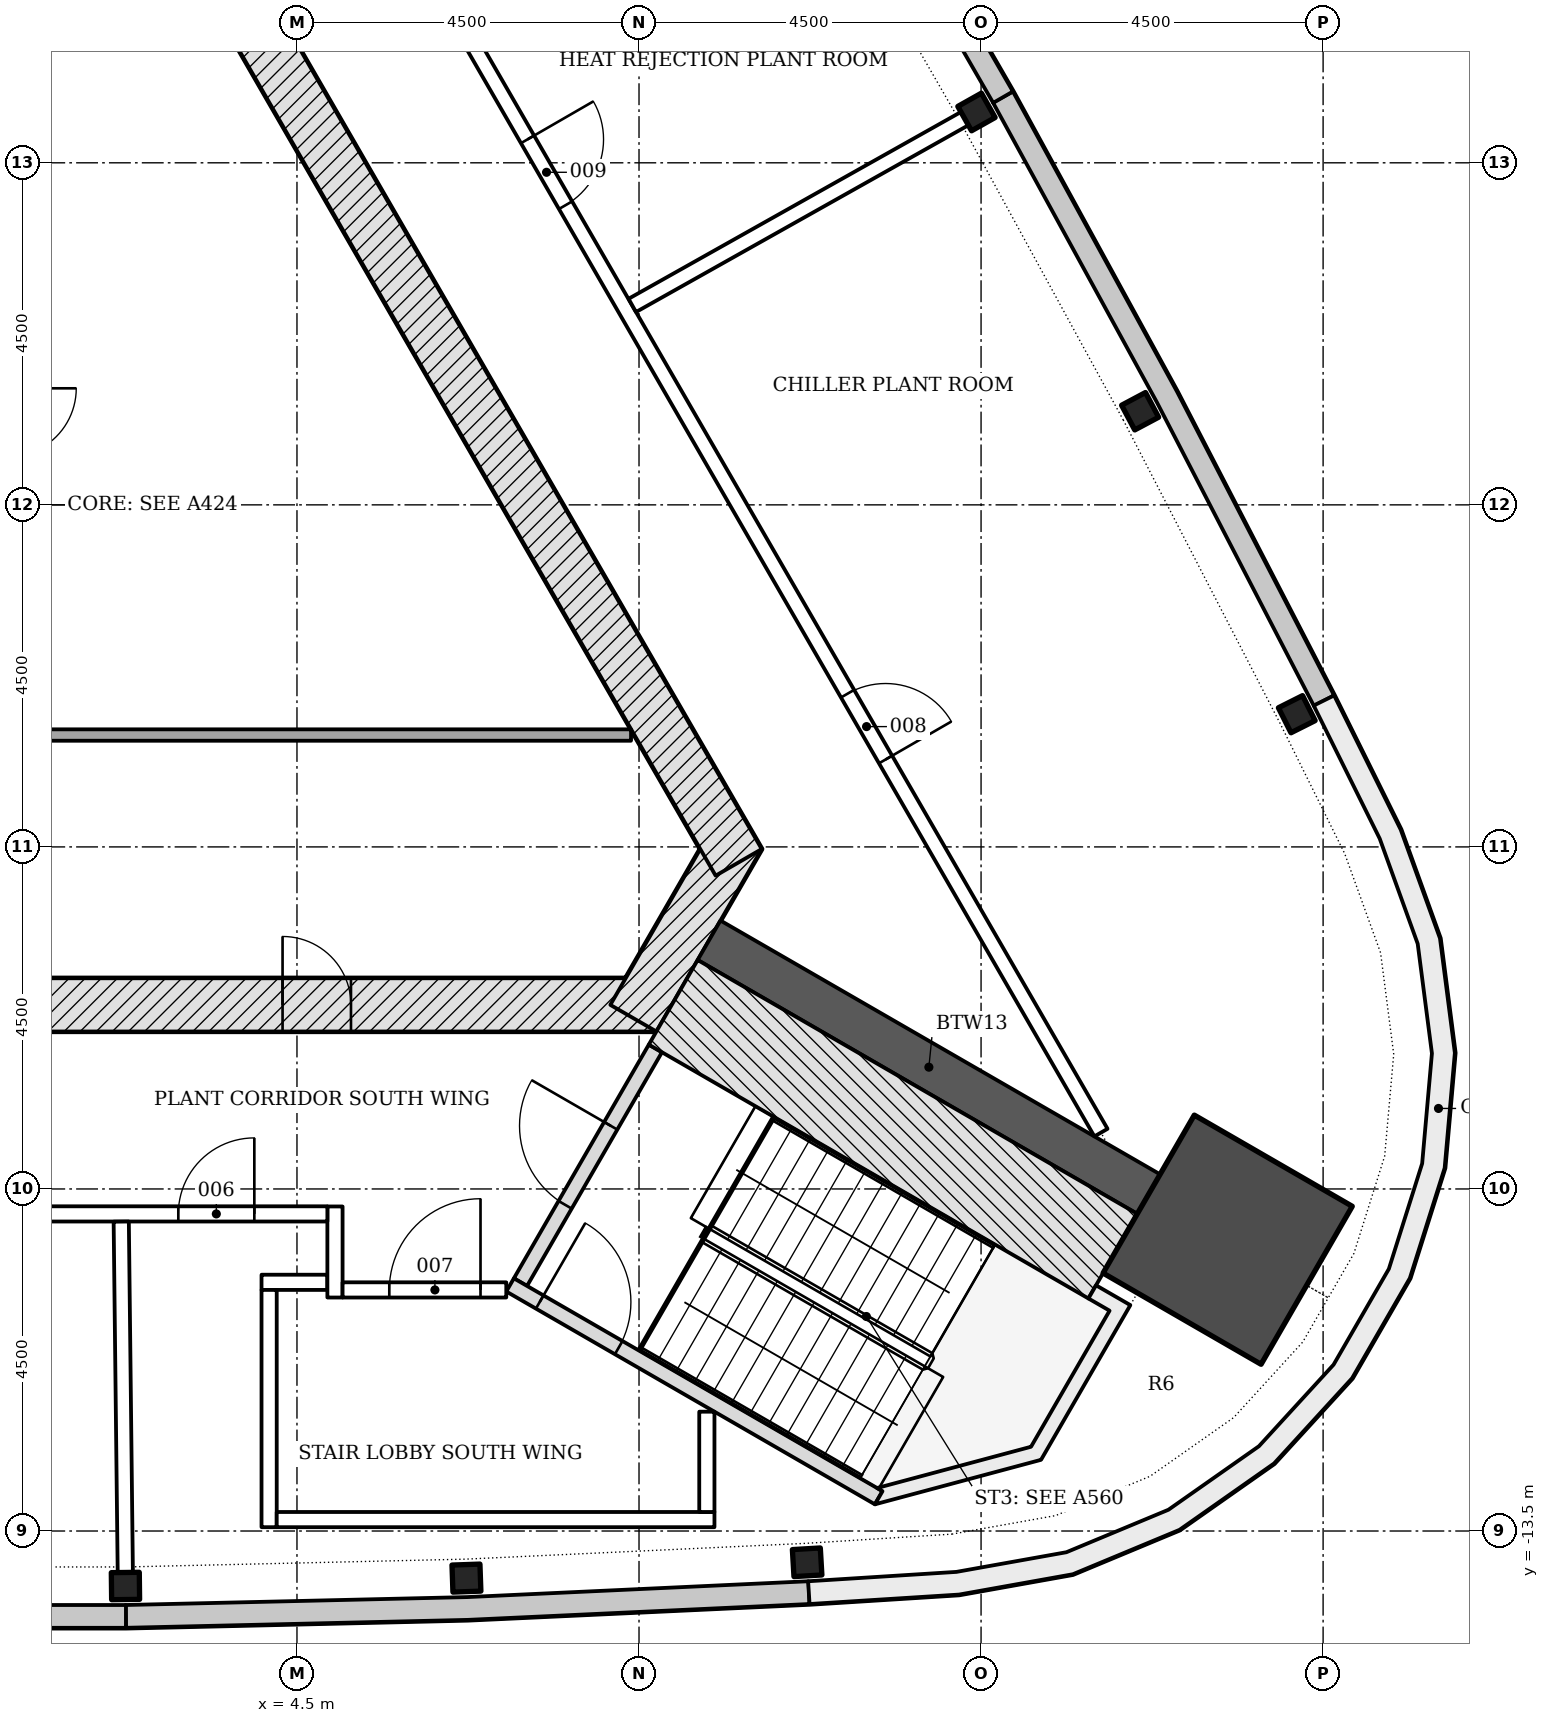
"""IFC4 building model, lengths in metres.
Left out: names, types, materials, properties, quantities, classifications, styles, units other than length and angle.
Written with IfcOpenShell. Run it as: python <this file> out.ifc"""

import sys

from ifc_helpers import new_model, si_unit, direction, frame, frame_2d, origin, origin_2d, place, context, subcontext, project, spatial, polyline, rectangle, i_section, outline, extrude, element, fill, save


model = new_model("IFC4")
c1 = context("Model", 3, precision=1e-05, world=origin(), true_north=direction((0.0, 1.0)))
c2 = subcontext(c1, "Body", "Model", "MODEL_VIEW")
j1 = project(units=[si_unit("LENGTHUNIT", "METRE"), si_unit("PLANEANGLEUNIT", "RADIAN")], contexts=[c1])
p1 = place(None, origin())
s1 = spatial("IfcSite", under=j1, at=p1, CompositionType="ELEMENT")
p2 = place(p1, origin())
s2 = spatial("IfcBuilding", under=s1, at=p2, CompositionType="ELEMENT")
p3 = place(p2, frame((0.0, 0.0, 288.6)))
s3 = spatial("IfcBuildingStorey", under=s2, at=p3, CompositionType="ELEMENT", Elevation=288.6)
p4 = place(p3, frame((-9.229, -6.578, -0.25), z_axis=(0.0, 0.0, 1.0), x_axis=(1.0, 0.0, 0.0)))
e1 = element("IfcWall", 1, at=p4, inside=s3, PredefinedType="SHEAR", context=c2, shape_type="SweptSolid", body=[
    extrude(rectangle(XDim=18.458, YDim=0.7, at=frame_2d((9.229, 0.0))), origin(), (0.0, 0.0, 1.0), 4.5),
])
p5 = place(p4, frame((8.7, 0.0, 0.25)))
e2 = element("IfcOpeningElement", 2, at=p5, cuts=e1, PredefinedType="OPENING", context=c2, shape_type="SweptSolid", body=[
    extrude(rectangle(XDim=1.0, YDim=2.1, at=frame_2d((0.5, 1.05))), frame((0.0, 0.36, 0.0), z_axis=(0.0, -1.0, 0.0), x_axis=(1.0, 0.0, 0.0)), (0.0, 0.0, 1.0), 0.72),
])
p6 = place(p4, frame((3.99, 0.0, 0.25)))
e3 = element("IfcOpeningElement", 3, at=p6, cuts=e1, PredefinedType="OPENING", context=c2, shape_type="SweptSolid", body=[
    extrude(rectangle(XDim=0.9, YDim=2.1, at=frame_2d((0.45, 1.05))), frame((0.0, 0.36, 0.0), z_axis=(0.0, -1.0, 0.0), x_axis=(1.0, 0.0, 0.0)), (0.0, 0.0, 1.0), 0.72),
])
p7 = place(p4, frame((13.539, 0.0, 0.25)))
e4 = element("IfcOpeningElement", 4, at=p7, cuts=e1, PredefinedType="OPENING", context=c2, shape_type="SweptSolid", body=[
    extrude(rectangle(XDim=0.9, YDim=2.1, at=frame_2d((0.45, 1.05))), frame((0.0, 0.36, 0.0), z_axis=(0.0, -1.0, 0.0), x_axis=(1.0, 0.0, 0.0)), (0.0, 0.0, 1.0), 0.72),
])
p8 = place(p3, frame((8.926, -6.753, -0.25), z_axis=(0.0, 0.0, 1.0), x_axis=(0.500042739161, 0.866000726912, 0.0)))
e5 = element("IfcWall", 5, at=p8, inside=s3, PredefinedType="SHEAR", context=c2, shape_type="SweptSolid", body=[
    extrude(rectangle(XDim=2.771, YDim=0.7, at=frame_2d((1.386, 0.0))), origin(), (0.0, 0.0, 1.0), 4.5),
])
p9 = place(p3, frame((10.311, -4.703, -0.25), z_axis=(0.0, 0.0, 1.0), x_axis=(-0.500001446645, 0.866024568562, 0.0)))
e6 = element("IfcWall", 6, at=p9, inside=s3, PredefinedType="SHEAR", context=c2, shape_type="SweptSolid", body=[
    extrude(rectangle(XDim=18.458, YDim=0.7, at=frame_2d((9.229, 0.0))), origin(), (0.0, 0.0, 1.0), 4.5),
])
p10 = place(p3, frame((9.922, -5.728, -0.25), z_axis=(0.0, 0.0, 1.0), x_axis=(0.866032176823, -0.499988268569, 0.0)))
e7 = element("IfcWall", 7, at=p10, inside=s3, PredefinedType="SHEAR", context=c2, shape_type="SweptSolid", body=[
    extrude(rectangle(XDim=6.678, YDim=0.6, at=frame_2d((3.339, 0.0))), origin(), (0.0, 0.0, 1.0), 4.5),
])
p11 = place(p3, frame((16.745, -9.667, -0.25), z_axis=(0.0, 0.0, 1.0), x_axis=(0.866025403784, -0.5, 0.0)))
e8 = element("IfcColumn", 8, at=p11, inside=s3, PredefinedType="COLUMN", context=c2, shape_type="SweptSolid", body=[
    extrude(rectangle(XDim=2.4, YDim=2.4, at=origin_2d()), origin(), (0.0, 0.0, 1.0), 4.5),
])
for number, where, z_axis, x_axis in (
    (9, (2.244, -14.224, -0.25), (0.0, 0.0, 1.0), (1.0, 0.012, 0.0)),
    (10, (6.729, -14.119, -0.25), (0.0, 0.0, 1.0), (0.999, 0.035, 0.0)),
    (11, (11.212, -13.911, -0.25), (0.0, 0.0, 1.0), (0.998, 0.058, 0.0)),
    (12, (17.654, -2.754, -0.25), (0.0, 0.0, 1.0), (-0.449, 0.894, 0.0)),
    (13, (15.593, 1.232, -0.25), (0.0, 0.0, 1.0), (-0.47, 0.883, 0.0)),
    (14, (13.44, 5.169, -0.25), (0.0, 0.0, 1.0), (-0.49, 0.872, 0.0)),
):
    element("IfcColumn", number, at=place(p3, frame(where, z_axis=z_axis, x_axis=x_axis)), inside=s3, PredefinedType="COLUMN", context=c2, shape_type="SweptSolid", body=[
        extrude(i_section(OverallWidth=0.368, OverallDepth=0.356, WebThickness=0.011, FlangeThickness=0.018, FilletRadius=0.015, at=origin_2d()), origin(), (0.0, 0.0, 1.0), 4.5),
    ])
p12 = place(p3, origin())
e15 = element("IfcWall", 15, at=p12, inside=s3, PredefinedType="NOTDEFINED", context=c2, shape_type="SweptSolid", body=[
    extrude(outline(polyline([(2.25, -14.773), (6.749, -14.669), (11.244, -14.46), (11.23, -14.161), (6.738, -14.369), (2.243, -14.474), (2.25, -14.773)])), origin(), (0.0, 0.0, 1.0), 4.25),
])
p13 = place(p3, origin())
e16 = element("IfcWall", 16, at=p13, inside=s3, PredefinedType="NOTDEFINED", context=c2, shape_type="SweptSolid", body=[
    extrude(outline(polyline([(-2.25, -14.773), (2.25, -14.773), (2.25, -14.473), (-2.25, -14.473), (-2.25, -14.773)])), origin(), (0.0, 0.0, 1.0), 1.2),
])
p14 = place(p3, origin())
e17 = element("IfcWall", 17, at=p14, inside=s3, PredefinedType="NOTDEFINED", context=c2, shape_type="SweptSolid", body=[
    extrude(outline(polyline([(18.145, -2.507), (16.078, 1.49), (13.919, 5.438), (13.656, 5.294), (15.813, 1.349), (17.878, -2.645), (18.145, -2.507)])), origin(), (0.0, 0.0, 1.0), 4.25),
])
p15 = place(p3, origin())
e18 = element("IfcWall", 18, at=p15, inside=s3, PredefinedType="NOTDEFINED", context=c2, shape_type="SweptSolid", body=[
    extrude(outline(polyline([(13.919, 5.438), (11.669, 9.335), (11.409, 9.185), (13.659, 5.288), (13.919, 5.438)])), origin(), (0.0, 0.0, 1.0), 1.2),
])
p16 = place(p3, origin())
e19 = element("IfcWall", 19, at=p16, inside=s3, PredefinedType="NOTDEFINED", context=c2, shape_type="SweptSolid", body=[
    extrude(outline(polyline([(11.244, -14.46), (13.211, -14.336), (14.708, -14.069), (16.111, -13.485), (17.355, -12.611), (18.381, -11.49), (19.141, -10.174), (19.599, -8.724), (19.733, -7.21), (19.538, -5.703), (19.021, -4.273), (18.145, -2.507), (17.876, -2.64), (18.745, -4.391), (19.244, -5.774), (19.432, -7.216), (19.303, -8.665), (18.865, -10.052), (18.138, -11.312), (17.156, -12.385), (15.965, -13.22), (14.623, -13.779), (13.176, -14.038), (11.225, -14.161), (11.244, -14.46)])), origin(), (0.0, 0.0, 1.0), 4.25),
])
p17 = place(p3, frame((1.071, -3.028, 0.0), z_axis=(0.0, 0.0, 1.0), x_axis=(1.0, 0.0, 0.0)))
e20 = element("IfcWall", 20, at=p17, inside=s3, PredefinedType="PARTITIONING", context=c2, shape_type="SweptSolid", body=[
    extrude(rectangle(XDim=7.824, YDim=0.15, at=frame_2d((3.912, 0.0))), origin(), (0.0, 0.0, 1.0), 4.25),
])
p18 = place(p3, frame((7.44, -10.226, -0.25), z_axis=(0.0, 0.0, 1.0), x_axis=(0.500022077904, 0.866012656725, 0.0)))
e21 = element("IfcWall", 21, at=p18, inside=s3, PredefinedType="SHEAR", context=c2, shape_type="SweptSolid", body=[
    extrude(rectangle(XDim=3.55, YDim=0.2, at=frame_2d((1.775, 0.0))), origin(), (0.0, 0.0, 1.0), 4.5),
])
p19 = place(p18, frame((1.175, 0.0, 0.25)))
e22 = element("IfcOpeningElement", 22, at=p19, cuts=e21, PredefinedType="OPENING", context=c2, shape_type="SweptSolid", body=[
    extrude(rectangle(XDim=1.2, YDim=2.1, at=frame_2d((0.6, 1.05))), frame((0.0, 0.11, 0.0), z_axis=(0.0, -1.0, 0.0), x_axis=(1.0, 0.0, 0.0)), (0.0, 0.0, 1.0), 0.22),
])
p20 = place(p3, frame((7.304, -10.262, -0.25), z_axis=(0.0, 0.0, 1.0), x_axis=(0.866026594901, -0.49999793692, 0.0)))
e23 = element("IfcWall", 23, at=p20, inside=s3, PredefinedType="SHEAR", context=c2, shape_type="SweptSolid", body=[
    extrude(rectangle(XDim=5.6, YDim=0.2, at=frame_2d((2.8, 0.0))), origin(), (0.0, 0.0, 1.0), 4.5),
])
p21 = place(p20, frame((0.45, 0.0, 0.25)))
e24 = element("IfcOpeningElement", 24, at=p21, cuts=e23, PredefinedType="OPENING", context=c2, shape_type="SweptSolid", body=[
    extrude(rectangle(XDim=1.2, YDim=2.1, at=frame_2d((0.6, 1.05))), frame((0.0, 0.11, 0.0), z_axis=(0.0, -1.0, 0.0), x_axis=(1.0, 0.0, 0.0)), (0.0, 0.0, 1.0), 0.22),
])
p22 = place(p3, frame((9.45, -6.545, -0.25), z_axis=(0.0, 0.0, 1.0), x_axis=(0.866016347338, -0.500015685897, 0.0)))
e25 = element("IfcWall", 25, at=p22, inside=s3, PredefinedType="SHEAR", context=c2, shape_type="SweptSolid", body=[
    extrude(rectangle(XDim=6.678, YDim=1.286, at=frame_2d((3.339, 0.0))), origin(), (0.0, 0.0, 1.0), 4.5),
])
p23 = place(p3, frame((0.0, 0.0, -0.25)))
e26 = element("IfcWall", 26, at=p23, inside=s3, PredefinedType="SHEAR", context=c2, shape_type="SweptSolid", body=[
    extrude(outline(polyline([(12.104, -13.149), (14.289, -12.563), (15.464, -10.528), (15.013, -10.268), (14.913, -10.441), (15.191, -10.601), (14.157, -12.392), (12.132, -12.934), (12.204, -12.976), (12.204, -12.976), (12.204, -12.976), (12.204, -12.976), (12.204, -12.976), (12.204, -12.976), (12.204, -12.976), (12.204, -12.976), (12.204, -12.976), (12.204, -12.976), (12.204, -12.976), (12.204, -12.976), (12.204, -12.976), (12.204, -12.976), (12.204, -12.976), (12.204, -12.976), (12.204, -12.976), (12.104, -13.149)])), origin(), (0.0, 0.0, 1.0), 4.5),
])
p24 = place(p3, frame((4.034, -10.228, 0.0), z_axis=(0.0, 0.0, 1.0), x_axis=(1.0, 0.0, 0.0)))
e27 = element("IfcWall", 27, at=p24, inside=s3, PredefinedType="PARTITIONING", context=c2, shape_type="SweptSolid", body=[
    extrude(rectangle(XDim=0.866, YDim=0.2, at=frame_2d((0.433, 0.0))), origin(), (0.0, 0.0, 1.0), 4.25),
])
p25 = place(p3, frame((5.0, -10.428, 0.0), z_axis=(0.0, 0.0, 1.0), x_axis=(0.0, 1.0, 0.0)))
e28 = element("IfcWall", 28, at=p25, inside=s3, PredefinedType="PARTITIONING", context=c2, shape_type="SweptSolid", body=[
    extrude(rectangle(XDim=1.198, YDim=0.2, at=frame_2d((0.599, 0.0))), origin(), (0.0, 0.0, 1.0), 4.25),
])
p26 = place(p3, frame((5.1, -10.328, 0.0), z_axis=(0.0, 0.0, 1.0), x_axis=(1.0, 0.0, 0.0)))
e29 = element("IfcWall", 29, at=p26, inside=s3, PredefinedType="PARTITIONING", context=c2, shape_type="SweptSolid", body=[
    extrude(rectangle(XDim=2.154, YDim=0.2, at=frame_2d((1.077, 0.0))), origin(), (0.0, 0.0, 1.0), 3.702),
])
p27 = place(p26, frame((0.615, 0.0, 0.0)))
e30 = element("IfcOpeningElement", 30, at=p27, cuts=e29, PredefinedType="OPENING", context=c2, shape_type="SweptSolid", body=[
    extrude(rectangle(XDim=1.2, YDim=2.1, at=frame_2d((0.6, 1.05))), frame((0.0, 0.11, 0.0), z_axis=(0.0, -1.0, 0.0), x_axis=(1.0, 0.0, 0.0)), (0.0, 0.0, 1.0), 0.22),
])
p28 = place(p3, frame((-15.397, -9.328, 0.0), z_axis=(0.0, 0.0, 1.0), x_axis=(1.0, 0.0, 0.0)))
e31 = element("IfcWall", 31, at=p28, inside=s3, PredefinedType="PARTITIONING", context=c2, shape_type="SweptSolid", body=[
    extrude(rectangle(XDim=20.297, YDim=0.2, at=frame_2d((10.148, 0.0))), origin(), (0.0, 0.0, 1.0), 3.702),
])
p29 = place(p28, frame((3.838, 0.0, 0.0)))
e32 = element("IfcOpeningElement", 32, at=p29, cuts=e31, PredefinedType="OPENING", context=c2, shape_type="SweptSolid", body=[
    extrude(rectangle(XDim=1.0, YDim=2.1, at=frame_2d((0.5, 1.05))), frame((0.0, 0.11, 0.0), z_axis=(0.0, -1.0, 0.0), x_axis=(1.0, 0.0, 0.0)), (0.0, 0.0, 1.0), 0.22),
])
p30 = place(p28, frame((12.608, 0.0, 0.0)))
e33 = element("IfcOpeningElement", 33, at=p30, cuts=e31, PredefinedType="OPENING", context=c2, shape_type="SweptSolid", body=[
    extrude(rectangle(XDim=1.0, YDim=2.1, at=frame_2d((0.5, 1.05))), frame((0.0, 0.11, 0.0), z_axis=(0.0, -1.0, 0.0), x_axis=(1.0, 0.0, 0.0)), (0.0, 0.0, 1.0), 0.22),
])
p31 = place(p28, frame((18.336, 0.0, 0.0)))
e34 = element("IfcOpeningElement", 34, at=p31, cuts=e31, PredefinedType="OPENING", context=c2, shape_type="SweptSolid", body=[
    extrude(rectangle(XDim=1.0, YDim=2.1, at=frame_2d((0.5, 1.05))), frame((0.0, 0.11, 0.0), z_axis=(0.0, -1.0, 0.0), x_axis=(1.0, 0.0, 0.0)), (0.0, 0.0, 1.0), 0.22),
])
p32 = place(p3, frame((2.188, -9.429, 0.0), z_axis=(0.0, 0.0, 1.0), x_axis=(0.011564782234, -0.99993312567, 0.0)))
e35 = element("IfcWall", 35, at=p32, inside=s3, PredefinedType="PARTITIONING", context=c2, shape_type="SweptSolid", body=[
    extrude(rectangle(XDim=4.644, YDim=0.2, at=frame_2d((2.322, 0.0))), origin(), (0.0, 0.0, 1.0), 3.702),
])
p33 = place(p3, frame((4.134, -10.328, 0.0), z_axis=(0.0, 0.0, 1.0), x_axis=(0.0, -1.0, 0.0)))
e36 = element("IfcWall", 36, at=p33, inside=s3, PredefinedType="PARTITIONING", context=c2, shape_type="SweptSolid", body=[
    extrude(rectangle(XDim=3.122, YDim=0.2, at=frame_2d((1.561, 0.0))), origin(), (0.0, 0.0, 1.0), 4.25),
])
p34 = place(p3, frame((4.234, -13.35, 0.0), z_axis=(0.0, 0.0, 1.0), x_axis=(1.0, 0.0, 0.0)))
e37 = element("IfcWall", 37, at=p34, inside=s3, PredefinedType="PARTITIONING", context=c2, shape_type="SweptSolid", body=[
    extrude(rectangle(XDim=5.759, YDim=0.2, at=frame_2d((2.879, 0.0))), origin(), (0.0, 0.0, 1.0), 3.702),
])
p35 = place(p3, frame((9.893, -13.25, 0.0), z_axis=(0.0, 0.0, 1.0), x_axis=(0.0, 1.0, 0.0)))
e38 = element("IfcWall", 38, at=p35, inside=s3, PredefinedType="PARTITIONING", context=c2, shape_type="SweptSolid", body=[
    extrude(rectangle(XDim=1.32, YDim=0.2, at=frame_2d((0.66, 0.0))), origin(), (0.0, 0.0, 1.0), 4.25),
])
p36 = place(p3, frame((5.282, 8.708, 0.0), z_axis=(0.0, 0.0, 1.0), x_axis=(0.500001848211, -0.866024336717, 0.0)))
e39 = element("IfcWall", 39, at=p36, inside=s3, PredefinedType="PARTITIONING", context=c2, shape_type="SweptSolid", body=[
    extrude(rectangle(XDim=19.591, YDim=0.2, at=frame_2d((9.795, 0.0))), origin(), (0.0, 0.0, 1.0), 3.702),
])
p37 = place(p36, frame((12.923, 0.0, 0.0)))
e40 = element("IfcOpeningElement", 40, at=p37, cuts=e39, PredefinedType="OPENING", context=c2, shape_type="SweptSolid", body=[
    extrude(rectangle(XDim=1.0, YDim=2.1, at=frame_2d((0.5, 1.05))), frame((0.0, 0.11, 0.0), z_axis=(0.0, -1.0, 0.0), x_axis=(1.0, 0.0, 0.0)), (0.0, 0.0, 1.0), 0.22),
])
p38 = place(p36, frame((4.502, 0.0, 0.0)))
e41 = element("IfcOpeningElement", 41, at=p38, cuts=e39, PredefinedType="OPENING", context=c2, shape_type="SweptSolid", body=[
    extrude(rectangle(XDim=1.0, YDim=2.1, at=frame_2d((0.5, 1.05))), frame((0.0, 0.11, 0.0), z_axis=(0.0, -1.0, 0.0), x_axis=(1.0, 0.0, 0.0)), (0.0, 0.0, 1.0), 0.22),
])
p39 = place(p36, frame((0.965, 0.0, 0.0)))
e42 = element("IfcOpeningElement", 42, at=p39, cuts=e39, PredefinedType="OPENING", context=c2, shape_type="SweptSolid", body=[
    extrude(rectangle(XDim=1.0, YDim=2.1, at=frame_2d((0.5, 1.05))), frame((0.0, 0.11, 0.0), z_axis=(0.0, -1.0, 0.0), x_axis=(1.0, 0.0, 0.0)), (0.0, 0.0, 1.0), 0.22),
])
p40 = place(p3, frame((8.911, 2.624, 0.0), z_axis=(0.0, 0.0, 1.0), x_axis=(0.871756434121, 0.48993950603, 0.0)))
e43 = element("IfcWall", 43, at=p40, inside=s3, PredefinedType="PARTITIONING", context=c2, shape_type="SweptSolid", body=[
    extrude(rectangle(XDim=5.044, YDim=0.2, at=frame_2d((2.522, 0.0))), origin(), (0.0, 0.0, 1.0), 3.702),
])
p41 = place(p7, origin())
e44 = element("IfcDoor", 44, at=p41, inside=s3, OperationType="SINGLE_SWING_LEFT", PredefinedType="DOOR", context=c2, shape_type="SweptSolid", body=[
    extrude(rectangle(XDim=0.9, YDim=2.1, at=frame_2d((0.45, 1.05))), frame((0.0, 0.075, 0.0), z_axis=(0.0, -1.0, 0.0), x_axis=(1.0, 0.0, 0.0)), (0.0, 0.0, 1.0), 0.15),
])
fill(e4, e44)
p42 = place(p19, origin())
e45 = element("IfcDoor", 45, at=p42, inside=s3, OperationType="SINGLE_SWING_RIGHT", PredefinedType="DOOR", context=c2, shape_type="SweptSolid", body=[
    extrude(rectangle(XDim=1.2, YDim=2.1, at=frame_2d((0.6, 1.05))), frame((0.0, 0.025, 0.0), z_axis=(0.0, -1.0, 0.0), x_axis=(1.0, 0.0, 0.0)), (0.0, 0.0, 1.0), 0.05),
])
fill(e22, e45)
p43 = place(p21, origin())
e46 = element("IfcDoor", 46, at=p43, inside=s3, OperationType="SINGLE_SWING_LEFT", PredefinedType="DOOR", context=c2, shape_type="SweptSolid", body=[
    extrude(rectangle(XDim=1.2, YDim=2.1, at=frame_2d((0.6, 1.05))), frame((0.0, 0.025, 0.0), z_axis=(0.0, -1.0, 0.0), x_axis=(1.0, 0.0, 0.0)), (0.0, 0.0, 1.0), 0.05),
])
fill(e24, e46)
p44 = place(p31, origin())
e47 = element("IfcDoor", 47, at=p44, inside=s3, OperationType="SINGLE_SWING_RIGHT", PredefinedType="DOOR", context=c2, shape_type="SweptSolid", body=[
    extrude(rectangle(XDim=1.0, YDim=2.1, at=frame_2d((0.5, 1.05))), frame((0.0, 0.025, 0.0), z_axis=(0.0, -1.0, 0.0), x_axis=(1.0, 0.0, 0.0)), (0.0, 0.0, 1.0), 0.05),
])
fill(e34, e47)
p45 = place(p27, origin())
e48 = element("IfcDoor", 48, at=p45, inside=s3, OperationType="SINGLE_SWING_RIGHT", PredefinedType="DOOR", context=c2, shape_type="SweptSolid", body=[
    extrude(rectangle(XDim=1.2, YDim=2.1, at=frame_2d((0.6, 1.05))), frame((0.0, 0.025, 0.0), z_axis=(0.0, -1.0, 0.0), x_axis=(1.0, 0.0, 0.0)), (0.0, 0.0, 1.0), 0.05),
])
fill(e30, e48)
p46 = place(p37, origin())
e49 = element("IfcDoor", 49, at=p46, inside=s3, OperationType="SINGLE_SWING_RIGHT", PredefinedType="DOOR", context=c2, shape_type="SweptSolid", body=[
    extrude(rectangle(XDim=1.0, YDim=2.1, at=frame_2d((0.5, 1.05))), frame((0.0, 0.025, 0.0), z_axis=(0.0, -1.0, 0.0), x_axis=(1.0, 0.0, 0.0)), (0.0, 0.0, 1.0), 0.05),
])
fill(e40, e49)
p47 = place(p38, origin())
e50 = element("IfcDoor", 50, at=p47, inside=s3, OperationType="SINGLE_SWING_LEFT", PredefinedType="DOOR", context=c2, shape_type="SweptSolid", body=[
    extrude(rectangle(XDim=1.0, YDim=2.1, at=frame_2d((0.5, 1.05))), frame((0.0, 0.025, 0.0), z_axis=(0.0, -1.0, 0.0), x_axis=(1.0, 0.0, 0.0)), (0.0, 0.0, 1.0), 0.05),
])
fill(e41, e50)
save(model, sys.argv[1])
